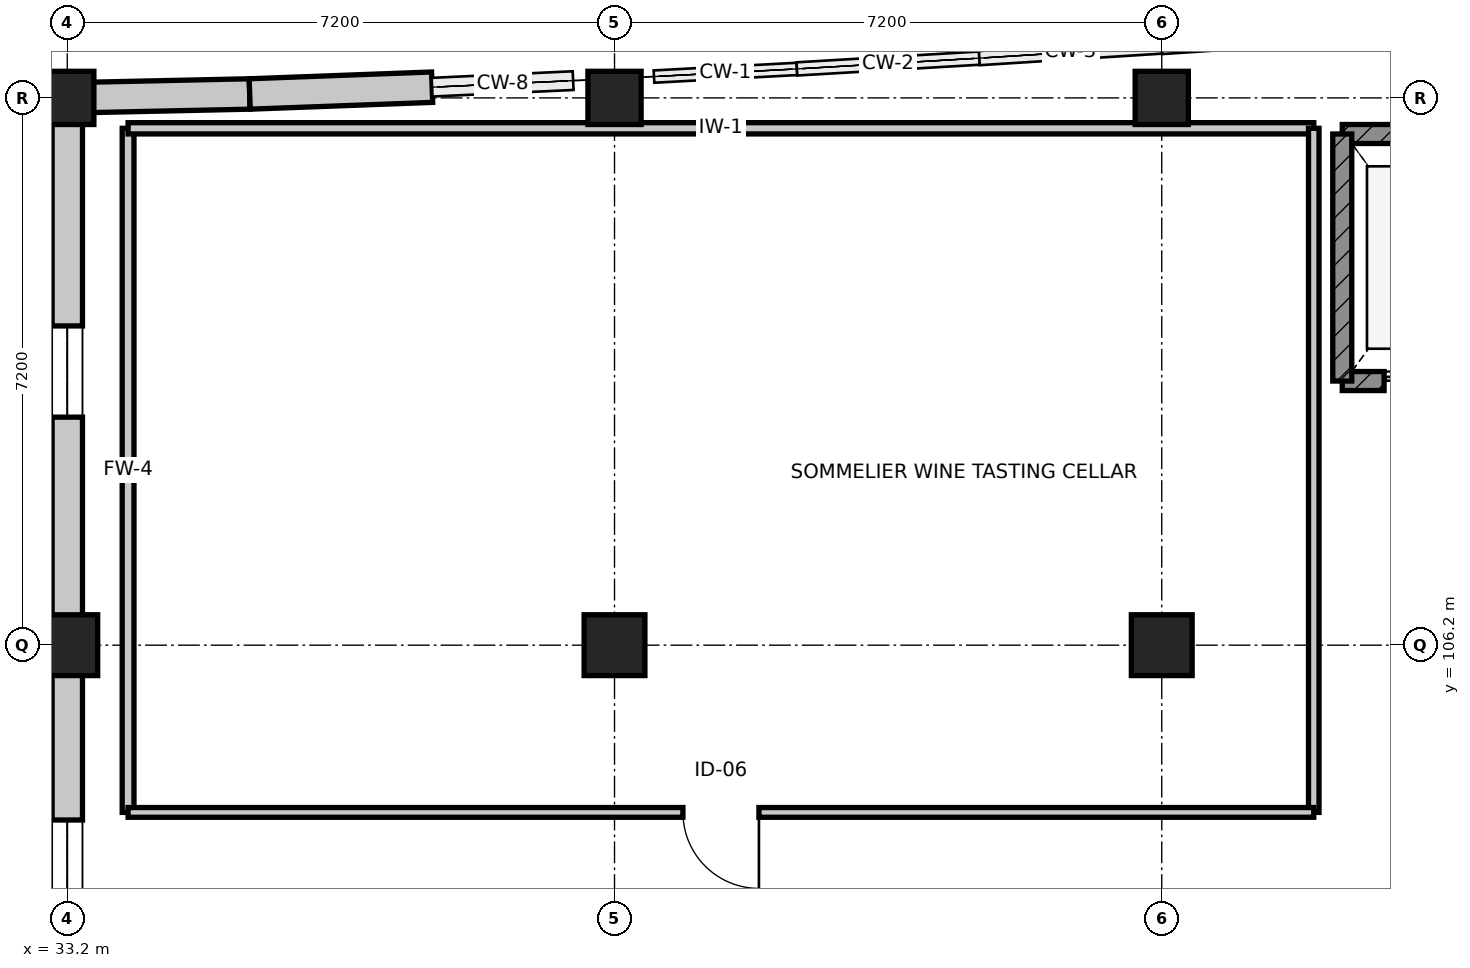
"""IFC4 building model, lengths in metres.
Left out: names, types, materials, properties, quantities, classifications, styles, units other than length and angle.
Written with IfcOpenShell. Run it as: python <this file> out.ifc"""

import sys

from ifc_helpers import new_model, si_unit, direction, frame, frame_2d, origin, origin_2d, place, context, subcontext, project, spatial, rectangle, extrude, element, fill, save


model = new_model("IFC4")
c1 = context("Model", 3, precision=1e-05, world=origin(), true_north=direction((0.0, 1.0)))
c2 = subcontext(c1, "Body", "Model", "MODEL_VIEW")
j1 = project(units=[si_unit("LENGTHUNIT", "METRE"), si_unit("PLANEANGLEUNIT", "RADIAN")], contexts=[c1])
p1 = place(None, origin())
s1 = spatial("IfcSite", under=j1, at=p1, CompositionType="ELEMENT")
p2 = place(p1, origin())
s2 = spatial("IfcBuilding", under=s1, at=p2, CompositionType="ELEMENT")
p3 = place(p2, frame((0.0, 0.0, 5.4)))
s3 = spatial("IfcBuildingStorey", under=s2, at=p3, CompositionType="ELEMENT", Elevation=5.4)
p4 = place(p3, frame((33.2, 106.2, 0.0), z_axis=(0.0, 0.0, 1.0), x_axis=(1.0, 0.0, 0.0)))
e1 = element("IfcColumn", 1, at=p4, inside=s3, PredefinedType="COLUMN", context=c2, shape_type="SweptSolid", body=[
    extrude(rectangle(XDim=0.8, YDim=0.8, at=origin_2d()), origin(), (0.0, 0.0, 1.0), 5.1),
])
p5 = place(p3, frame((33.2, 113.4, 0.0), z_axis=(0.0, 0.0, 1.0), x_axis=(1.0, 0.0, 0.0)))
e2 = element("IfcColumn", 2, at=p5, inside=s3, PredefinedType="COLUMN", context=c2, shape_type="SweptSolid", body=[
    extrude(rectangle(XDim=0.7, YDim=0.7, at=origin_2d()), origin(), (0.0, 0.0, 1.0), 5.1),
])
p6 = place(p3, frame((40.4, 106.2, 0.0), z_axis=(0.0, 0.0, 1.0), x_axis=(1.0, 0.0, 0.0)))
e3 = element("IfcColumn", 3, at=p6, inside=s3, PredefinedType="COLUMN", context=c2, shape_type="SweptSolid", body=[
    extrude(rectangle(XDim=0.8, YDim=0.8, at=origin_2d()), origin(), (0.0, 0.0, 1.0), 5.1),
])
p7 = place(p3, frame((40.4, 113.4, 0.0), z_axis=(0.0, 0.0, 1.0), x_axis=(1.0, 0.0, 0.0)))
e4 = element("IfcColumn", 4, at=p7, inside=s3, PredefinedType="COLUMN", context=c2, shape_type="SweptSolid", body=[
    extrude(rectangle(XDim=0.7, YDim=0.7, at=origin_2d()), origin(), (0.0, 0.0, 1.0), 5.1),
])
p8 = place(p3, frame((47.6, 106.2, 0.0), z_axis=(0.0, 0.0, 1.0), x_axis=(1.0, 0.0, 0.0)))
e5 = element("IfcColumn", 5, at=p8, inside=s3, PredefinedType="COLUMN", context=c2, shape_type="SweptSolid", body=[
    extrude(rectangle(XDim=0.8, YDim=0.8, at=origin_2d()), origin(), (0.0, 0.0, 1.0), 5.1),
])
p9 = place(p3, frame((47.6, 113.4, 0.0), z_axis=(0.0, 0.0, 1.0), x_axis=(1.0, 0.0, 0.0)))
e6 = element("IfcColumn", 6, at=p9, inside=s3, PredefinedType="COLUMN", context=c2, shape_type="SweptSolid", body=[
    extrude(rectangle(XDim=0.7, YDim=0.7, at=origin_2d()), origin(), (0.0, 0.0, 1.0), 5.1),
])
p10 = place(p3, frame((33.2, 99.0, 0.0), z_axis=(0.0, 0.0, 1.0), x_axis=(0.0, 1.0, 0.0)))
e7 = element("IfcWall", 7, at=p10, inside=s3, PredefinedType="STANDARD", context=c2, shape_type="SweptSolid", body=[
    extrude(rectangle(XDim=7.2, YDim=0.4, at=frame_2d((3.6, 0.0))), origin(), (0.0, 0.0, 1.0), 4.115),
])
p11 = place(p10, frame((2.3, 0.0, 0.9)))
e8 = element("IfcOpeningElement", 8, at=p11, cuts=e7, PredefinedType="OPENING", context=c2, shape_type="SweptSolid", body=[
    extrude(rectangle(XDim=2.6, YDim=2.2, at=frame_2d((1.3, 1.1))), frame((0.0, 0.21, 0.0), z_axis=(0.0, -1.0, 0.0), x_axis=(1.0, 0.0, 0.0)), (0.0, 0.0, 1.0), 0.42),
])
p12 = place(p3, frame((33.2, 106.2, 0.0), z_axis=(0.0, 0.0, 1.0), x_axis=(0.0, 1.0, 0.0)))
e9 = element("IfcWall", 9, at=p12, inside=s3, PredefinedType="STANDARD", context=c2, shape_type="SweptSolid", body=[
    extrude(rectangle(XDim=7.2, YDim=0.4, at=frame_2d((3.6, 0.0))), origin(), (0.0, 0.0, 1.0), 4.115),
])
p13 = place(p12, frame((3.0, 0.0, 0.9)))
e10 = element("IfcOpeningElement", 10, at=p13, cuts=e9, PredefinedType="OPENING", context=c2, shape_type="SweptSolid", body=[
    extrude(rectangle(XDim=1.2, YDim=1.8, at=frame_2d((0.6, 0.9))), frame((0.0, 0.21, 0.0), z_axis=(0.0, -1.0, 0.0), x_axis=(1.0, 0.0, 0.0)), (0.0, 0.0, 1.0), 0.42),
])
p14 = place(p3, frame((33.2, 113.4, 0.0), z_axis=(0.0, 0.0, 1.0), x_axis=(0.999767568547, 0.021559426766, 0.0)))
e11 = element("IfcWall", 11, at=p14, inside=s3, PredefinedType="STANDARD", context=c2, shape_type="SweptSolid", body=[
    extrude(rectangle(XDim=2.401, YDim=0.4, at=frame_2d((1.2, 0.0))), origin(), (0.0, 0.0, 1.0), 4.015),
])
p15 = place(p3, frame((35.6, 113.452, 0.0), z_axis=(0.0, 0.0, 1.0), x_axis=(0.99930757318, 0.037207179225, 0.0)))
e12 = element("IfcWall", 12, at=p15, inside=s3, PredefinedType="STANDARD", context=c2, shape_type="SweptSolid", body=[
    extrude(rectangle(XDim=2.402, YDim=0.4, at=frame_2d((1.201, 0.0))), origin(), (0.0, 0.0, 1.0), 4.015),
])
p16 = place(p3, frame((49.975, 109.675, 0.0), z_axis=(0.0, 0.0, 1.0), x_axis=(1.0, 0.0, 0.0)))
e13 = element("IfcWall", 13, at=p16, inside=s3, PredefinedType="SHEAR", context=c2, shape_type="SweptSolid", body=[
    extrude(rectangle(XDim=2.45, YDim=0.25, at=frame_2d((1.225, 0.0))), origin(), (0.0, 0.0, 1.0), 4.78),
])
p17 = place(p16, frame((0.55, 0.0, 0.0)))
e14 = element("IfcOpeningElement", 14, at=p17, cuts=e13, PredefinedType="OPENING", context=c2, shape_type="SweptSolid", body=[
    extrude(rectangle(XDim=1.35, YDim=2.2, at=frame_2d((0.675, 1.1))), frame((0.0, 0.135, 0.0), z_axis=(0.0, -1.0, 0.0), x_axis=(1.0, 0.0, 0.0)), (0.0, 0.0, 1.0), 0.27),
])
p18 = place(p3, frame((52.425, 112.925, 0.0), z_axis=(0.0, 0.0, 1.0), x_axis=(-1.0, 0.0, 0.0)))
e15 = element("IfcWall", 15, at=p18, inside=s3, PredefinedType="SHEAR", context=c2, shape_type="SweptSolid", body=[
    extrude(rectangle(XDim=2.45, YDim=0.25, at=frame_2d((1.225, 0.0))), origin(), (0.0, 0.0, 1.0), 4.78),
])
p19 = place(p3, frame((49.975, 112.925, 0.0), z_axis=(0.0, 0.0, 1.0), x_axis=(0.0, -1.0, 0.0)))
e16 = element("IfcWall", 16, at=p19, inside=s3, PredefinedType="SHEAR", context=c2, shape_type="SweptSolid", body=[
    extrude(rectangle(XDim=3.25, YDim=0.25, at=frame_2d((1.625, 0.0))), origin(), (0.0, 0.0, 1.0), 4.78),
])
p20 = place(p3, frame((34.0, 104.0, 0.0), z_axis=(0.0, 0.0, 1.0), x_axis=(0.0, 1.0, 0.0)))
e17 = element("IfcWall", 17, at=p20, inside=s3, PredefinedType="PARTITIONING", context=c2, shape_type="SweptSolid", body=[
    extrude(rectangle(XDim=9.0, YDim=0.155, at=frame_2d((4.5, 0.0))), origin(), (0.0, 0.0, 1.0), 4.015),
])
p21 = place(p3, frame((34.0, 113.0, 0.0), z_axis=(0.0, 0.0, 1.0), x_axis=(1.0, 0.0, 0.0)))
e18 = element("IfcWall", 18, at=p21, inside=s3, PredefinedType="PARTITIONING", context=c2, shape_type="SweptSolid", body=[
    extrude(rectangle(XDim=15.6, YDim=0.148, at=frame_2d((7.8, 0.0))), origin(), (0.0, 0.0, 1.0), 4.115),
])
p22 = place(p3, frame((49.6, 113.0, 0.0), z_axis=(0.0, 0.0, 1.0), x_axis=(0.0, -1.0, 0.0)))
e19 = element("IfcWall", 19, at=p22, inside=s3, PredefinedType="PARTITIONING", context=c2, shape_type="SweptSolid", body=[
    extrude(rectangle(XDim=9.0, YDim=0.138, at=frame_2d((4.5, 0.0))), origin(), (0.0, 0.0, 1.0), 4.015),
])
p23 = place(p3, frame((49.6, 104.0, 0.0), z_axis=(0.0, 0.0, 1.0), x_axis=(-1.0, 0.0, 0.0)))
e20 = element("IfcWall", 20, at=p23, inside=s3, PredefinedType="PARTITIONING", context=c2, shape_type="SweptSolid", body=[
    extrude(rectangle(XDim=15.6, YDim=0.128, at=frame_2d((7.8, 0.0))), origin(), (0.0, 0.0, 1.0), 4.115),
])
p24 = place(p23, frame((7.3, 0.0, 0.0)))
e21 = element("IfcOpeningElement", 21, at=p24, cuts=e20, PredefinedType="OPENING", context=c2, shape_type="SweptSolid", body=[
    extrude(rectangle(XDim=1.0, YDim=2.1, at=frame_2d((0.5, 1.05))), frame((0.0, 0.074, 0.0), z_axis=(0.0, -1.0, 0.0), x_axis=(1.0, 0.0, 0.0)), (0.0, 0.0, 1.0), 0.148),
])
p25 = place(p11, origin())
e22 = element("IfcWindow", 22, at=p25, inside=s3, PartitioningType="SINGLE_PANEL", PredefinedType="WINDOW", context=c2, shape_type="SweptSolid", body=[
    extrude(rectangle(XDim=2.6, YDim=2.2, at=frame_2d((1.3, 1.1))), frame((0.0, 0.03, 0.0), z_axis=(0.0, -1.0, 0.0), x_axis=(1.0, 0.0, 0.0)), (0.0, 0.0, 1.0), 0.06),
])
fill(e8, e22)
p26 = place(p13, origin())
e23 = element("IfcWindow", 23, at=p26, inside=s3, PartitioningType="SINGLE_PANEL", PredefinedType="WINDOW", context=c2, shape_type="SweptSolid", body=[
    extrude(rectangle(XDim=1.2, YDim=1.8, at=frame_2d((0.6, 0.9))), frame((0.0, 0.03, 0.0), z_axis=(0.0, -1.0, 0.0), x_axis=(1.0, 0.0, 0.0)), (0.0, 0.0, 1.0), 0.06),
])
fill(e10, e23)
p27 = place(p17, origin())
e24 = element("IfcDoor", 24, at=p27, inside=s3, OperationType="DOUBLE_DOOR_SLIDING", PredefinedType="DOOR", context=c2, shape_type="SweptSolid", body=[
    extrude(rectangle(XDim=1.35, YDim=2.2, at=frame_2d((0.675, 1.1))), frame((0.0, 0.025, 0.0), z_axis=(0.0, -1.0, 0.0), x_axis=(1.0, 0.0, 0.0)), (0.0, 0.0, 1.0), 0.05),
])
fill(e14, e24)
p28 = place(p24, origin())
e25 = element("IfcDoor", 25, at=p28, inside=s3, OperationType="SINGLE_SWING_LEFT", PredefinedType="DOOR", context=c2, shape_type="SweptSolid", body=[
    extrude(rectangle(XDim=1.0, YDim=2.1, at=frame_2d((0.5, 1.05))), frame((0.0, 0.025, 0.0), z_axis=(0.0, -1.0, 0.0), x_axis=(1.0, 0.0, 0.0)), (0.0, 0.0, 1.0), 0.05),
])
fill(e21, e25)
save(model, sys.argv[1])
